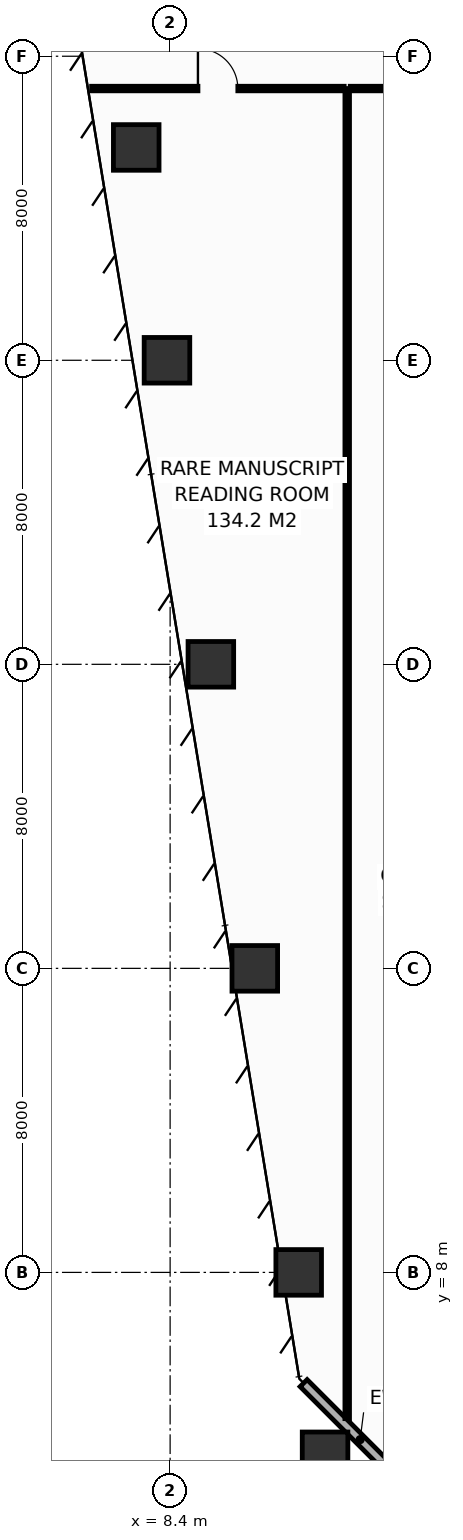
"""IFC4 building model, lengths in metres.
Left out: names, types, materials, properties, quantities, classifications, styles, units other than length and angle.
Written with IfcOpenShell. Run it as: python <this file> out.ifc"""

import sys

from ifc_helpers import new_model, si_unit, direction, frame, frame_2d, origin, origin_2d, place, context, subcontext, project, spatial, rectangle, hollow_rectangle, extrude, element, fill, save


model = new_model("IFC4")
c1 = context("Model", 3, precision=1e-05, world=origin(), true_north=direction((0.0, 1.0)))
c2 = subcontext(c1, "Body", "Model", "MODEL_VIEW")
j1 = project(units=[si_unit("LENGTHUNIT", "METRE"), si_unit("PLANEANGLEUNIT", "RADIAN")], contexts=[c1])
p1 = place(None, origin())
s1 = spatial("IfcSite", under=j1, at=p1, CompositionType="ELEMENT")
p2 = place(p1, origin())
s2 = spatial("IfcBuilding", under=s1, at=p2, CompositionType="ELEMENT")
p3 = place(p2, frame((0.0, 0.0, 51.6)))
s3 = spatial("IfcBuildingStorey", under=s2, at=p3, CompositionType="ELEMENT", Elevation=51.6)
for number, where, z_axis, x_axis in (
    (1, (12.477, 3.2, 0.0), (0.0, 0.0, 1.0), (1.0, 0.0, 0.0)),
    (2, (11.783, 8.0, 0.0), (0.0, 0.0, 1.0), (1.0, 0.0, 0.0)),
    (3, (10.628, 16.0, 0.0), (0.0, 0.0, 1.0), (1.0, 0.0, 0.0)),
    (4, (9.472, 24.0, 0.0), (0.0, 0.0, 1.0), (1.0, 0.0, 0.0)),
    (5, (8.317, 32.0, 0.0), (0.0, 0.0, 1.0), (1.0, 0.0, 0.0)),
    (6, (7.508, 37.6, 0.0), (0.0, 0.0, 1.0), (1.0, 0.0, 0.0)),
):
    element("IfcColumn", number, at=place(p3, frame(where, z_axis=z_axis, x_axis=x_axis)), inside=s3, PredefinedType="COLUMN", context=c2, shape_type="SweptSolid", body=[
        extrude(hollow_rectangle(XDim=1.2, YDim=1.2, WallThickness=0.055, at=origin_2d()), origin(), (0.0, 0.0, 1.0), 4.4),
    ])
p4 = place(p3, frame((11.913, 5.087, 0.0), z_axis=(0.0, 0.0, 1.0), x_axis=(0.707106781187, -0.707106781187, 0.0)))
e7 = element("IfcWall", 7, at=p4, inside=s3, PredefinedType="STANDARD", context=c2, shape_type="SweptSolid", body=[
    extrude(rectangle(XDim=4.206, YDim=0.26, at=frame_2d((2.103, 0.0))), origin(), (0.0, 0.0, 1.0), 4.15),
])
p5 = place(p3, frame((13.06, 4.152, 0.0), z_axis=(0.0, 0.0, 1.0), x_axis=(0.0, 1.0, 0.0)))
e8 = element("IfcWall", 8, at=p5, inside=s3, PredefinedType="PARTITIONING", context=c2, shape_type="SweptSolid", body=[
    extrude(rectangle(XDim=34.998, YDim=0.12, at=frame_2d((17.499, 0.0))), origin(), (0.0, 0.0, 1.0), 3.335),
])
p6 = place(p3, frame((6.334, 39.15, 0.0), z_axis=(0.0, 0.0, 1.0), x_axis=(1.0, 0.0, 0.0)))
e9 = element("IfcWall", 9, at=p6, inside=s3, PredefinedType="PARTITIONING", context=c2, shape_type="SweptSolid", body=[
    extrude(rectangle(XDim=6.646, YDim=0.12, at=frame_2d((3.323, 0.0))), origin(), (0.0, 0.0, 1.0), 3.635),
])
p7 = place(p6, frame((2.798, 0.0, 0.0)))
e10 = element("IfcOpeningElement", 10, at=p7, cuts=e9, PredefinedType="OPENING", context=c2, shape_type="SweptSolid", body=[
    extrude(rectangle(XDim=1.05, YDim=2.15, at=frame_2d((0.525, 1.075))), frame((0.0, 0.07, 0.0), z_axis=(0.0, -1.0, 0.0), x_axis=(1.0, 0.0, 0.0)), (0.0, 0.0, 1.0), 0.14),
])
p8 = place(p3, frame((13.14, 39.15, 0.0), z_axis=(0.0, 0.0, 1.0), x_axis=(1.0, 0.0, 0.0)))
e11 = element("IfcWall", 11, at=p8, inside=s3, PredefinedType="PARTITIONING", context=c2, shape_type="SweptSolid", body=[
    extrude(rectangle(XDim=5.58, YDim=0.12, at=frame_2d((2.79, 0.0))), origin(), (0.0, 0.0, 1.0), 4.15),
])
p9 = place(p8, frame((2.265, 0.0, 0.0)))
e12 = element("IfcOpeningElement", 12, at=p9, cuts=e11, PredefinedType="OPENING", context=c2, shape_type="SweptSolid", body=[
    extrude(rectangle(XDim=1.05, YDim=2.15, at=frame_2d((0.525, 1.075))), frame((0.0, 0.07, 0.0), z_axis=(0.0, -1.0, 0.0), x_axis=(1.0, 0.0, 0.0)), (0.0, 0.0, 1.0), 0.14),
])
p10 = place(p7, origin())
e13 = element("IfcDoor", 13, at=p10, inside=s3, OperationType="SINGLE_SWING_LEFT", PredefinedType="DOOR", context=c2, shape_type="SweptSolid", body=[
    extrude(rectangle(XDim=1.05, YDim=2.15, at=frame_2d((0.525, 1.075))), frame((0.0, 0.025, 0.0), z_axis=(0.0, -1.0, 0.0), x_axis=(1.0, 0.0, 0.0)), (0.0, 0.0, 1.0), 0.05),
])
fill(e10, e13)
save(model, sys.argv[1])
